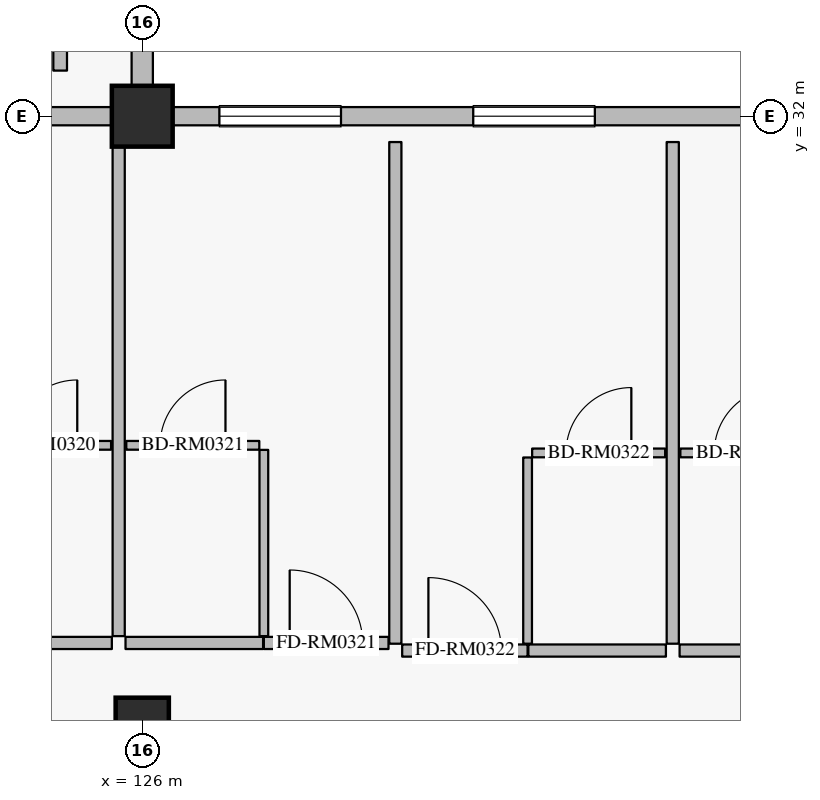
"""IFC4 building model, lengths in metres.
Left out: names, types, materials, properties, quantities, classifications, styles, units other than length and angle.
Written with IfcOpenShell. Run it as: python <this file> out.ifc"""

import sys

from ifc_helpers import new_model, si_unit, direction, frame, frame_2d, origin, origin_2d, place, context, subcontext, project, spatial, rectangle, extrude, element, fill, save


model = new_model("IFC4")
c1 = context("Model", 3, precision=1e-05, world=origin(), true_north=direction((0.0, 1.0)))
c2 = subcontext(c1, "Body", "Model", "MODEL_VIEW")
j1 = project(units=[si_unit("LENGTHUNIT", "METRE"), si_unit("PLANEANGLEUNIT", "RADIAN")], contexts=[c1])
p1 = place(None, origin())
s1 = spatial("IfcSite", under=j1, at=p1, CompositionType="ELEMENT")
p2 = place(p1, origin())
s2 = spatial("IfcBuilding", under=s1, at=p2, CompositionType="ELEMENT")
p3 = place(p2, frame((0.0, 0.0, 11.4)))
s3 = spatial("IfcBuildingStorey", under=s2, at=p3, CompositionType="ELEMENT", Elevation=11.4)
p4 = place(p3, frame((126.0, 32.0, 0.0), z_axis=(0.0, 0.0, 1.0), x_axis=(1.0, 0.0, 0.0)))
e1 = element("IfcColumn", 1, at=p4, inside=s3, PredefinedType="COLUMN", context=c2, shape_type="SweptSolid", body=[
    extrude(rectangle(XDim=0.8, YDim=0.8, at=origin_2d()), origin(), (0.0, 0.0, 1.0), 4.8),
])
p5 = place(p3, frame((126.0, 24.0, 0.0), z_axis=(0.0, 0.0, 1.0), x_axis=(1.0, 0.0, 0.0)))
e2 = element("IfcColumn", 2, at=p5, inside=s3, PredefinedType="COLUMN", context=c2, shape_type="SweptSolid", body=[
    extrude(rectangle(XDim=0.7, YDim=0.7, at=origin_2d()), origin(), (0.0, 0.0, 1.0), 4.8),
])
p6 = place(p3, frame((126.0, 39.65, 0.0), z_axis=(0.0, 0.0, 1.0), x_axis=(0.0, -1.0, 0.0)))
e3 = element("IfcWall", 3, at=p6, inside=s3, PredefinedType="SOLIDWALL", context=c2, shape_type="SweptSolid", body=[
    extrude(rectangle(XDim=7.25, YDim=0.28, at=frame_2d((3.625, 0.0))), origin(), (0.0, 0.0, 1.0), 4.5),
])
p7 = place(p6, frame((2.625, 0.0, 1.0)))
e4 = element("IfcOpeningElement", 4, at=p7, cuts=e3, PredefinedType="OPENING", context=c2, shape_type="SweptSolid", body=[
    extrude(rectangle(XDim=2.0, YDim=1.75, at=frame_2d((1.0, 0.875))), frame((0.0, 0.15, 0.0), z_axis=(0.0, -1.0, 0.0), x_axis=(1.0, 0.0, 0.0)), (0.0, 0.0, 1.0), 0.3),
])
p8 = place(p3, frame((118.0, 32.0, 0.0), z_axis=(0.0, 0.0, 1.0), x_axis=(1.0, 0.0, 0.0)))
e5 = element("IfcWall", 5, at=p8, inside=s3, PredefinedType="SOLIDWALL", context=c2, shape_type="SweptSolid", body=[
    extrude(rectangle(XDim=7.6, YDim=0.24, at=frame_2d((3.8, 0.0))), origin(), (0.0, 0.0, 1.0), 4.1),
])
p9 = place(p8, frame((1.42, 0.0, 0.8)))
e6 = element("IfcOpeningElement", 6, at=p9, cuts=e5, PredefinedType="OPENING", context=c2, shape_type="SweptSolid", body=[
    extrude(rectangle(XDim=1.6, YDim=1.6, at=frame_2d((0.8, 0.8))), frame((0.0, 0.13, 0.0), z_axis=(0.0, -1.0, 0.0), x_axis=(1.0, 0.0, 0.0)), (0.0, 0.0, 1.0), 0.26),
])
p10 = place(p8, frame((5.065, 0.0, 0.8)))
e7 = element("IfcOpeningElement", 7, at=p10, cuts=e5, PredefinedType="OPENING", context=c2, shape_type="SweptSolid", body=[
    extrude(rectangle(XDim=1.6, YDim=1.6, at=frame_2d((0.8, 0.8))), frame((0.0, 0.13, 0.0), z_axis=(0.0, -1.0, 0.0), x_axis=(1.0, 0.0, 0.0)), (0.0, 0.0, 1.0), 0.26),
])
p11 = place(p3, frame((126.4, 32.0, 0.0), z_axis=(0.0, 0.0, 1.0), x_axis=(1.0, 0.0, 0.0)))
e8 = element("IfcWall", 8, at=p11, inside=s3, PredefinedType="SOLIDWALL", context=c2, shape_type="SweptSolid", body=[
    extrude(rectangle(XDim=7.6, YDim=0.24, at=frame_2d((3.8, 0.0))), origin(), (0.0, 0.0, 1.0), 4.1),
])
p12 = place(p11, frame((0.615, 0.0, 0.8)))
e9 = element("IfcOpeningElement", 9, at=p12, cuts=e8, PredefinedType="OPENING", context=c2, shape_type="SweptSolid", body=[
    extrude(rectangle(XDim=1.6, YDim=1.6, at=frame_2d((0.8, 0.8))), frame((0.0, 0.13, 0.0), z_axis=(0.0, -1.0, 0.0), x_axis=(1.0, 0.0, 0.0)), (0.0, 0.0, 1.0), 0.26),
])
p13 = place(p11, frame((3.955, 0.0, 0.8)))
e10 = element("IfcOpeningElement", 10, at=p13, cuts=e8, PredefinedType="OPENING", context=c2, shape_type="SweptSolid", body=[
    extrude(rectangle(XDim=1.6, YDim=1.6, at=frame_2d((0.8, 0.8))), frame((0.0, 0.13, 0.0), z_axis=(0.0, -1.0, 0.0), x_axis=(1.0, 0.0, 0.0)), (0.0, 0.0, 1.0), 0.26),
])
p14 = place(p3, frame((123.79, 25.07, 0.0), z_axis=(0.0, 0.0, 1.0), x_axis=(1.0, 0.0, 0.0)))
e11 = element("IfcWall", 11, at=p14, inside=s3, PredefinedType="PARTITIONING", context=c2, shape_type="SweptSolid", body=[
    extrude(rectangle(XDim=1.81, YDim=0.16, at=frame_2d((0.905, 0.0))), origin(), (0.0, 0.0, 1.0), 4.535),
])
p15 = place(p3, frame((123.84, 27.67, 0.0), z_axis=(0.0, 0.0, 1.0), x_axis=(1.0, 0.0, 0.0)))
e12 = element("IfcWall", 12, at=p15, inside=s3, PredefinedType="PARTITIONING", context=c2, shape_type="SweptSolid", body=[
    extrude(rectangle(XDim=1.75, YDim=0.115, at=frame_2d((0.875, 0.0))), origin(), (0.0, 0.0, 1.0), 4.535),
])
p16 = place(p15, frame((0.445, 0.0, 0.0)))
e13 = element("IfcOpeningElement", 13, at=p16, cuts=e12, PredefinedType="OPENING", context=c2, shape_type="SweptSolid", body=[
    extrude(rectangle(XDim=0.86, YDim=2.12, at=frame_2d((0.43, 1.06))), frame((0.0, 0.067, 0.0), z_axis=(0.0, -1.0, 0.0), x_axis=(1.0, 0.0, 0.0)), (0.0, 0.0, 1.0), 0.135),
])
p17 = place(p3, frame((125.78, 25.07, 0.0), z_axis=(0.0, 0.0, 1.0), x_axis=(1.0, 0.0, 0.0)))
e14 = element("IfcWall", 14, at=p17, inside=s3, PredefinedType="PARTITIONING", context=c2, shape_type="SweptSolid", body=[
    extrude(rectangle(XDim=1.81, YDim=0.16, at=frame_2d((0.905, 0.0))), origin(), (0.0, 0.0, 1.0), 4.535),
])
p18 = place(p3, frame((127.6, 25.07, 0.0), z_axis=(0.0, 0.0, 1.0), x_axis=(1.0, 0.0, 0.0)))
e15 = element("IfcWall", 15, at=p18, inside=s3, PredefinedType="PARTITIONING", context=c2, shape_type="SweptSolid", body=[
    extrude(rectangle(XDim=1.64, YDim=0.16, at=frame_2d((0.82, 0.0))), origin(), (0.0, 0.0, 1.0), 4.535),
])
p19 = place(p18, frame((0.34, 0.0, 0.0)))
e16 = element("IfcOpeningElement", 16, at=p19, cuts=e15, PredefinedType="OPENING", context=c2, shape_type="SweptSolid", body=[
    extrude(rectangle(XDim=0.96, YDim=2.2, at=frame_2d((0.48, 1.1))), frame((0.0, 0.09, 0.0), z_axis=(0.0, -1.0, 0.0), x_axis=(1.0, 0.0, 0.0)), (0.0, 0.0, 1.0), 0.18),
])
p20 = place(p3, frame((127.6, 25.16, 0.0), z_axis=(0.0, 0.0, 1.0), x_axis=(0.0, 1.0, 0.0)))
e17 = element("IfcWall", 17, at=p20, inside=s3, PredefinedType="PARTITIONING", context=c2, shape_type="SweptSolid", body=[
    extrude(rectangle(XDim=2.45, YDim=0.115, at=frame_2d((1.225, 0.0))), origin(), (0.0, 0.0, 1.0), 4.535),
])
p21 = place(p3, frame((125.79, 27.67, 0.0), z_axis=(0.0, 0.0, 1.0), x_axis=(1.0, 0.0, 0.0)))
e18 = element("IfcWall", 18, at=p21, inside=s3, PredefinedType="PARTITIONING", context=c2, shape_type="SweptSolid", body=[
    extrude(rectangle(XDim=1.75, YDim=0.115, at=frame_2d((0.875, 0.0))), origin(), (0.0, 0.0, 1.0), 4.535),
])
p22 = place(p21, frame((0.445, 0.0, 0.0)))
e19 = element("IfcOpeningElement", 19, at=p22, cuts=e18, PredefinedType="OPENING", context=c2, shape_type="SweptSolid", body=[
    extrude(rectangle(XDim=0.86, YDim=2.12, at=frame_2d((0.43, 1.06))), frame((0.0, 0.067, 0.0), z_axis=(0.0, -1.0, 0.0), x_axis=(1.0, 0.0, 0.0)), (0.0, 0.0, 1.0), 0.135),
])
p23 = place(p3, frame((125.69, 25.16, 0.0), z_axis=(0.0, 0.0, 1.0), x_axis=(0.0, 1.0, 0.0)))
e20 = element("IfcWall", 20, at=p23, inside=s3, PredefinedType="PARTITIONING", context=c2, shape_type="SweptSolid", body=[
    extrude(rectangle(XDim=6.5, YDim=0.16, at=frame_2d((3.25, 0.0))), origin(), (0.0, 0.0, 1.0), 4.535),
])
p24 = place(p3, frame((129.42, 24.97, 0.0), z_axis=(0.0, 0.0, 1.0), x_axis=(1.0, 0.0, 0.0)))
e21 = element("IfcWall", 21, at=p24, inside=s3, PredefinedType="PARTITIONING", context=c2, shape_type="SweptSolid", body=[
    extrude(rectangle(XDim=1.65, YDim=0.16, at=frame_2d((0.825, 0.0))), origin(), (0.0, 0.0, 1.0), 4.535),
])
p25 = place(p24, frame((0.345, 0.0, 0.0)))
e22 = element("IfcOpeningElement", 22, at=p25, cuts=e21, PredefinedType="OPENING", context=c2, shape_type="SweptSolid", body=[
    extrude(rectangle(XDim=0.96, YDim=2.2, at=frame_2d((0.48, 1.1))), frame((0.0, 0.09, 0.0), z_axis=(0.0, -1.0, 0.0), x_axis=(1.0, 0.0, 0.0)), (0.0, 0.0, 1.0), 0.18),
])
p26 = place(p3, frame((131.08, 24.97, 0.0), z_axis=(0.0, 0.0, 1.0), x_axis=(1.0, 0.0, 0.0)))
e23 = element("IfcWall", 23, at=p26, inside=s3, PredefinedType="PARTITIONING", context=c2, shape_type="SweptSolid", body=[
    extrude(rectangle(XDim=1.81, YDim=0.16, at=frame_2d((0.905, 0.0))), origin(), (0.0, 0.0, 1.0), 4.535),
])
p27 = place(p3, frame((131.07, 25.06, 0.0), z_axis=(0.0, 0.0, 1.0), x_axis=(0.0, 1.0, 0.0)))
e24 = element("IfcWall", 24, at=p27, inside=s3, PredefinedType="PARTITIONING", context=c2, shape_type="SweptSolid", body=[
    extrude(rectangle(XDim=2.45, YDim=0.115, at=frame_2d((1.225, 0.0))), origin(), (0.0, 0.0, 1.0), 4.535),
])
p28 = place(p3, frame((131.13, 27.57, 0.0), z_axis=(0.0, 0.0, 1.0), x_axis=(1.0, 0.0, 0.0)))
e25 = element("IfcWall", 25, at=p28, inside=s3, PredefinedType="PARTITIONING", context=c2, shape_type="SweptSolid", body=[
    extrude(rectangle(XDim=1.75, YDim=0.115, at=frame_2d((0.875, 0.0))), origin(), (0.0, 0.0, 1.0), 4.535),
])
p29 = place(p28, frame((0.445, 0.0, 0.0)))
e26 = element("IfcOpeningElement", 26, at=p29, cuts=e25, PredefinedType="OPENING", context=c2, shape_type="SweptSolid", body=[
    extrude(rectangle(XDim=0.86, YDim=2.12, at=frame_2d((0.43, 1.06))), frame((0.0, 0.067, 0.0), z_axis=(0.0, -1.0, 0.0), x_axis=(1.0, 0.0, 0.0)), (0.0, 0.0, 1.0), 0.135),
])
p30 = place(p3, frame((129.33, 25.06, 0.0), z_axis=(0.0, 0.0, 1.0), x_axis=(0.0, 1.0, 0.0)))
e27 = element("IfcWall", 27, at=p30, inside=s3, PredefinedType="PARTITIONING", context=c2, shape_type="SweptSolid", body=[
    extrude(rectangle(XDim=6.6, YDim=0.16, at=frame_2d((3.3, 0.0))), origin(), (0.0, 0.0, 1.0), 4.535),
])
p31 = place(p3, frame((133.07, 24.97, 0.0), z_axis=(0.0, 0.0, 1.0), x_axis=(1.0, 0.0, 0.0)))
e28 = element("IfcWall", 28, at=p31, inside=s3, PredefinedType="PARTITIONING", context=c2, shape_type="SweptSolid", body=[
    extrude(rectangle(XDim=1.81, YDim=0.16, at=frame_2d((0.905, 0.0))), origin(), (0.0, 0.0, 1.0), 4.535),
])
p32 = place(p3, frame((133.08, 27.57, 0.0), z_axis=(0.0, 0.0, 1.0), x_axis=(1.0, 0.0, 0.0)))
e29 = element("IfcWall", 29, at=p32, inside=s3, PredefinedType="PARTITIONING", context=c2, shape_type="SweptSolid", body=[
    extrude(rectangle(XDim=1.75, YDim=0.115, at=frame_2d((0.875, 0.0))), origin(), (0.0, 0.0, 1.0), 4.535),
])
p33 = place(p32, frame((0.445, 0.0, 0.0)))
e30 = element("IfcOpeningElement", 30, at=p33, cuts=e29, PredefinedType="OPENING", context=c2, shape_type="SweptSolid", body=[
    extrude(rectangle(XDim=0.86, YDim=2.12, at=frame_2d((0.43, 1.06))), frame((0.0, 0.067, 0.0), z_axis=(0.0, -1.0, 0.0), x_axis=(1.0, 0.0, 0.0)), (0.0, 0.0, 1.0), 0.135),
])
p34 = place(p3, frame((132.98, 25.06, 0.0), z_axis=(0.0, 0.0, 1.0), x_axis=(0.0, 1.0, 0.0)))
e31 = element("IfcWall", 31, at=p34, inside=s3, PredefinedType="PARTITIONING", context=c2, shape_type="SweptSolid", body=[
    extrude(rectangle(XDim=6.6, YDim=0.16, at=frame_2d((3.3, 0.0))), origin(), (0.0, 0.0, 1.0), 4.535),
])
p35 = place(p3, frame((124.92, 32.6, 0.0), z_axis=(0.0, 0.0, 1.0), x_axis=(0.0, 1.0, 0.0)))
e32 = element("IfcWall", 32, at=p35, inside=s3, PredefinedType="PARTITIONING", context=c2, shape_type="SweptSolid", body=[
    extrude(rectangle(XDim=11.6, YDim=0.18, at=frame_2d((5.8, 0.0))), origin(), (0.0, 0.0, 1.0), 4.535),
])
p36 = place(p12, origin())
e33 = element("IfcWindow", 33, at=p36, inside=s3, PartitioningType="SINGLE_PANEL", PredefinedType="WINDOW", context=c2, shape_type="SweptSolid", body=[
    extrude(rectangle(XDim=1.6, YDim=1.6, at=frame_2d((0.8, 0.8))), frame((0.0, 0.03, 0.0), z_axis=(0.0, -1.0, 0.0), x_axis=(1.0, 0.0, 0.0)), (0.0, 0.0, 1.0), 0.06),
])
fill(e9, e33)
p37 = place(p13, origin())
e34 = element("IfcWindow", 34, at=p37, inside=s3, PartitioningType="SINGLE_PANEL", PredefinedType="WINDOW", context=c2, shape_type="SweptSolid", body=[
    extrude(rectangle(XDim=1.6, YDim=1.6, at=frame_2d((0.8, 0.8))), frame((0.0, 0.03, 0.0), z_axis=(0.0, -1.0, 0.0), x_axis=(1.0, 0.0, 0.0)), (0.0, 0.0, 1.0), 0.06),
])
fill(e10, e34)
p38 = place(p16, origin())
e35 = element("IfcDoor", 35, at=p38, inside=s3, OperationType="SINGLE_SWING_RIGHT", PredefinedType="DOOR", context=c2, shape_type="SweptSolid", body=[
    extrude(rectangle(XDim=0.86, YDim=2.12, at=frame_2d((0.43, 1.06))), frame((0.0, 0.025, 0.0), z_axis=(0.0, -1.0, 0.0), x_axis=(1.0, 0.0, 0.0)), (0.0, 0.0, 1.0), 0.05),
])
fill(e13, e35)
p39 = place(p19, origin())
e36 = element("IfcDoor", 36, at=p39, inside=s3, OperationType="SINGLE_SWING_LEFT", PredefinedType="DOOR", context=c2, shape_type="SweptSolid", body=[
    extrude(rectangle(XDim=0.96, YDim=2.2, at=frame_2d((0.48, 1.1))), frame((0.0, 0.025, 0.0), z_axis=(0.0, -1.0, 0.0), x_axis=(1.0, 0.0, 0.0)), (0.0, 0.0, 1.0), 0.05),
])
fill(e16, e36)
p40 = place(p22, origin())
e37 = element("IfcDoor", 37, at=p40, inside=s3, OperationType="SINGLE_SWING_RIGHT", PredefinedType="DOOR", context=c2, shape_type="SweptSolid", body=[
    extrude(rectangle(XDim=0.86, YDim=2.12, at=frame_2d((0.43, 1.06))), frame((0.0, 0.025, 0.0), z_axis=(0.0, -1.0, 0.0), x_axis=(1.0, 0.0, 0.0)), (0.0, 0.0, 1.0), 0.05),
])
fill(e19, e37)
p41 = place(p25, origin())
e38 = element("IfcDoor", 38, at=p41, inside=s3, OperationType="SINGLE_SWING_LEFT", PredefinedType="DOOR", context=c2, shape_type="SweptSolid", body=[
    extrude(rectangle(XDim=0.96, YDim=2.2, at=frame_2d((0.48, 1.1))), frame((0.0, 0.025, 0.0), z_axis=(0.0, -1.0, 0.0), x_axis=(1.0, 0.0, 0.0)), (0.0, 0.0, 1.0), 0.05),
])
fill(e22, e38)
p42 = place(p29, origin())
e39 = element("IfcDoor", 39, at=p42, inside=s3, OperationType="SINGLE_SWING_RIGHT", PredefinedType="DOOR", context=c2, shape_type="SweptSolid", body=[
    extrude(rectangle(XDim=0.86, YDim=2.12, at=frame_2d((0.43, 1.06))), frame((0.0, 0.025, 0.0), z_axis=(0.0, -1.0, 0.0), x_axis=(1.0, 0.0, 0.0)), (0.0, 0.0, 1.0), 0.05),
])
fill(e26, e39)
p43 = place(p33, origin())
e40 = element("IfcDoor", 40, at=p43, inside=s3, OperationType="SINGLE_SWING_RIGHT", PredefinedType="DOOR", context=c2, shape_type="SweptSolid", body=[
    extrude(rectangle(XDim=0.86, YDim=2.12, at=frame_2d((0.43, 1.06))), frame((0.0, 0.025, 0.0), z_axis=(0.0, -1.0, 0.0), x_axis=(1.0, 0.0, 0.0)), (0.0, 0.0, 1.0), 0.05),
])
fill(e30, e40)
save(model, sys.argv[1])
